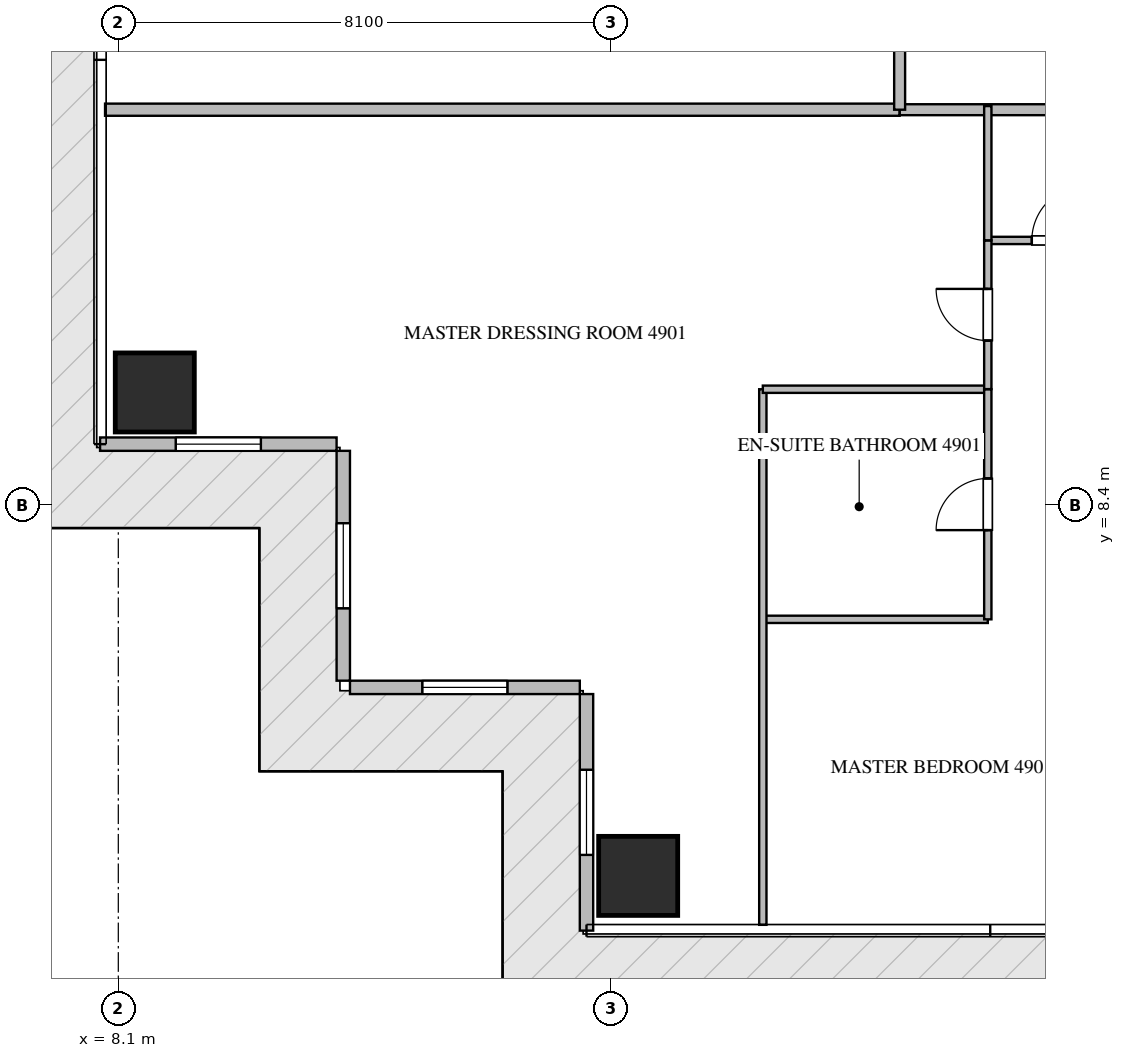
"""IFC4 building model, lengths in metres.
Left out: names, types, materials, properties, quantities, classifications, styles, units other than length and angle.
Written with IfcOpenShell. Run it as: python <this file> out.ifc"""

import sys

from ifc_helpers import new_model, si_unit, direction, frame, frame_2d, origin, origin_2d, place, context, subcontext, project, spatial, rectangle, extrude, source, transform, mapped, element, fill, save


model = new_model("IFC4")
c1 = context("Model", 3, precision=1e-05, world=origin(), true_north=direction((0.0, 1.0)))
c2 = subcontext(c1, "Body", "Model", "MODEL_VIEW")
j1 = project(units=[si_unit("LENGTHUNIT", "METRE"), si_unit("PLANEANGLEUNIT", "RADIAN")], contexts=[c1])
p1 = place(None, origin())
s1 = spatial("IfcSite", under=j1, at=p1, CompositionType="ELEMENT")
p2 = place(p1, origin())
s2 = spatial("IfcBuilding", under=s1, at=p2, CompositionType="ELEMENT")
p3 = place(p2, frame((0.0, 0.0, 195.15)))
s3 = spatial("IfcBuildingStorey", under=s2, at=p3, CompositionType="ELEMENT", Elevation=195.15)
m1 = source(origin(), c2, "Body", "SweptSolid", [
    extrude(rectangle(XDim=1.3, YDim=1.3, at=origin_2d()), origin(), (0.0, 0.0, 1.0), 3.57),
])
for number, where, z_axis, x_axis in (
    (1, (16.65, 2.3, -0.26), (0.0, 0.0, 1.0), (1.0, 0.0, 0.0)),
    (2, (8.7, 10.25, -0.26), (0.0, 0.0, 1.0), (1.0, 0.0, 0.0)),
):
    element("IfcColumn", number, at=place(p3, frame(where, z_axis=z_axis, x_axis=x_axis)), inside=s3, PredefinedType="COLUMN", context=c2, shape_type="MappedRepresentation", body=[
        mapped(m1, transform((0.0, 0.0, 0.0), scale=1.0)),
    ])
p4 = place(p3, frame((7.8, 9.4, 0.0), z_axis=(0.0, 0.0, 1.0), x_axis=(1.0, 0.0, 0.0)))
e3 = element("IfcWall", 3, at=p4, inside=s3, PredefinedType="ELEMENTEDWALL", context=c2, shape_type="SweptSolid", body=[
    extrude(rectangle(XDim=3.89, YDim=0.22, at=frame_2d((1.945, 0.0))), origin(), (0.0, 0.0, 1.0), 3.295),
])
p5 = place(p4, frame((1.245, 0.0, 0.65)))
e4 = element("IfcOpeningElement", 4, at=p5, cuts=e3, PredefinedType="OPENING", context=c2, shape_type="SweptSolid", body=[
    extrude(rectangle(XDim=1.4, YDim=1.35, at=frame_2d((0.7, 0.675))), frame((0.0, 0.12, 0.0), z_axis=(0.0, -1.0, 0.0), x_axis=(1.0, 0.0, 0.0)), (0.0, 0.0, 1.0), 0.24),
])
p6 = place(p3, frame((11.8, 9.29, 0.0), z_axis=(0.0, 0.0, 1.0), x_axis=(0.0, -1.0, 0.0)))
e5 = element("IfcWall", 5, at=p6, inside=s3, PredefinedType="ELEMENTEDWALL", context=c2, shape_type="SweptSolid", body=[
    extrude(rectangle(XDim=3.78, YDim=0.22, at=frame_2d((1.89, 0.0))), origin(), (0.0, 0.0, 1.0), 3.295),
])
p7 = place(p6, frame((1.19, 0.0, 0.65)))
e6 = element("IfcOpeningElement", 6, at=p7, cuts=e5, PredefinedType="OPENING", context=c2, shape_type="SweptSolid", body=[
    extrude(rectangle(XDim=1.4, YDim=1.35, at=frame_2d((0.7, 0.675))), frame((0.0, 0.12, 0.0), z_axis=(0.0, -1.0, 0.0), x_axis=(1.0, 0.0, 0.0)), (0.0, 0.0, 1.0), 0.24),
])
p8 = place(p3, frame((11.91, 5.4, 0.0), z_axis=(0.0, 0.0, 1.0), x_axis=(1.0, 0.0, 0.0)))
e7 = element("IfcWall", 7, at=p8, inside=s3, PredefinedType="ELEMENTEDWALL", context=c2, shape_type="SweptSolid", body=[
    extrude(rectangle(XDim=3.78, YDim=0.22, at=frame_2d((1.89, 0.0))), origin(), (0.0, 0.0, 1.0), 3.295),
])
p9 = place(p8, frame((1.19, 0.0, 0.65)))
e8 = element("IfcOpeningElement", 8, at=p9, cuts=e7, PredefinedType="OPENING", context=c2, shape_type="SweptSolid", body=[
    extrude(rectangle(XDim=1.4, YDim=1.35, at=frame_2d((0.7, 0.675))), frame((0.0, 0.12, 0.0), z_axis=(0.0, -1.0, 0.0), x_axis=(1.0, 0.0, 0.0)), (0.0, 0.0, 1.0), 0.24),
])
p10 = place(p3, frame((15.8, 5.29, 0.0), z_axis=(0.0, 0.0, 1.0), x_axis=(0.0, -1.0, 0.0)))
e9 = element("IfcWall", 9, at=p10, inside=s3, PredefinedType="ELEMENTEDWALL", context=c2, shape_type="SweptSolid", body=[
    extrude(rectangle(XDim=3.89, YDim=0.22, at=frame_2d((1.945, 0.0))), origin(), (0.0, 0.0, 1.0), 3.295),
])
p11 = place(p10, frame((1.245, 0.0, 0.65)))
e10 = element("IfcOpeningElement", 10, at=p11, cuts=e9, PredefinedType="OPENING", context=c2, shape_type="SweptSolid", body=[
    extrude(rectangle(XDim=1.4, YDim=1.35, at=frame_2d((0.7, 0.675))), frame((0.0, 0.12, 0.0), z_axis=(0.0, -1.0, 0.0), x_axis=(1.0, 0.0, 0.0)), (0.0, 0.0, 1.0), 0.24),
])
p12 = place(p3, frame((7.882, 14.9, 0.0), z_axis=(0.0, 0.0, 1.0), x_axis=(1.0, 0.0, 0.0)))
e11 = element("IfcWall", 11, at=p12, inside=s3, PredefinedType="PARTITIONING", context=c2, shape_type="SweptSolid", body=[
    extrude(rectangle(XDim=13.068, YDim=0.2, at=frame_2d((6.534, 0.0))), origin(), (0.0, 0.0, 1.0), 3.31),
])
p13 = place(p3, frame((20.952, 14.9, 0.0), z_axis=(0.0, 0.0, 1.0), x_axis=(1.0, 0.0, 0.0)))
e12 = element("IfcWall", 12, at=p13, inside=s3, PredefinedType="PARTITIONING", context=c2, shape_type="SweptSolid", body=[
    extrude(rectangle(XDim=22.896, YDim=0.18, at=frame_2d((11.448, 0.0))), origin(), (0.0, 0.0, 1.0), 2.145),
])
p14 = place(p13, frame((14.231, 0.0, 0.0)))
e13 = element("IfcOpeningElement", 13, at=p14, cuts=e12, PredefinedType="OPENING", context=c2, shape_type="SweptSolid", body=[
    extrude(rectangle(XDim=0.9, YDim=2.1, at=frame_2d((0.45, 1.05))), frame((0.0, 0.1, 0.0), z_axis=(0.0, -1.0, 0.0), x_axis=(1.0, 0.0, 0.0)), (0.0, 0.0, 1.0), 0.2),
])
p15 = place(p13, frame((19.203, 0.0, 0.0)))
e14 = element("IfcOpeningElement", 14, at=p15, cuts=e12, PredefinedType="OPENING", context=c2, shape_type="SweptSolid", body=[
    extrude(rectangle(XDim=0.9, YDim=2.1, at=frame_2d((0.45, 1.05))), frame((0.0, 0.1, 0.0), z_axis=(0.0, -1.0, 0.0), x_axis=(1.0, 0.0, 0.0)), (0.0, 0.0, 1.0), 0.2),
])
p16 = place(p3, frame((20.95, 14.9, 0.0), z_axis=(0.0, 0.0, 1.0), x_axis=(0.0, 1.0, 0.0)))
e15 = element("IfcWall", 15, at=p16, inside=s3, PredefinedType="PARTITIONING", context=c2, shape_type="SweptSolid", body=[
    extrude(rectangle(XDim=18.7, YDim=0.18, at=frame_2d((9.35, 0.0))), origin(), (0.0, 0.0, 1.0), 3.31),
])
p17 = place(p16, frame((1.805, 0.0, 0.0)))
e16 = element("IfcOpeningElement", 16, at=p17, cuts=e15, PredefinedType="OPENING", context=c2, shape_type="SweptSolid", body=[
    extrude(rectangle(XDim=1.0, YDim=2.15, at=frame_2d((0.5, 1.075))), frame((0.0, 0.1, 0.0), z_axis=(0.0, -1.0, 0.0), x_axis=(1.0, 0.0, 0.0)), (0.0, 0.0, 1.0), 0.2),
])
p18 = place(p16, frame((10.602, 0.0, 0.0)))
e17 = element("IfcOpeningElement", 17, at=p18, cuts=e15, PredefinedType="OPENING", context=c2, shape_type="SweptSolid", body=[
    extrude(rectangle(XDim=1.0, YDim=2.15, at=frame_2d((0.5, 1.075))), frame((0.0, 0.1, 0.0), z_axis=(0.0, -1.0, 0.0), x_axis=(1.0, 0.0, 0.0)), (0.0, 0.0, 1.0), 0.2),
])
p19 = place(p3, frame((22.4, 12.75, 0.0), z_axis=(0.0, 0.0, 1.0), x_axis=(1.0, 0.0, 0.0)))
e18 = element("IfcWall", 18, at=p19, inside=s3, PredefinedType="PARTITIONING", context=c2, shape_type="SweptSolid", body=[
    extrude(rectangle(XDim=2.348, YDim=0.12, at=frame_2d((1.174, 0.0))), origin(), (0.0, 0.0, 1.0), 3.31),
])
p20 = place(p19, frame((0.724, 0.0, 0.0)))
e19 = element("IfcOpeningElement", 19, at=p20, cuts=e18, PredefinedType="OPENING", context=c2, shape_type="SweptSolid", body=[
    extrude(rectangle(XDim=0.9, YDim=2.1, at=frame_2d((0.45, 1.05))), frame((0.0, 0.07, 0.0), z_axis=(0.0, -1.0, 0.0), x_axis=(1.0, 0.0, 0.0)), (0.0, 0.0, 1.0), 0.14),
])
p21 = place(p3, frame((18.7, 6.519, 0.0), z_axis=(0.0, 0.0, 1.0), x_axis=(1.0, 0.0, 0.0)))
e20 = element("IfcWall", 20, at=p21, inside=s3, PredefinedType="PARTITIONING", context=c2, shape_type="SweptSolid", body=[
    extrude(rectangle(XDim=3.7, YDim=0.12, at=frame_2d((1.85, 0.0))), origin(), (0.0, 0.0, 1.0), 3.31),
])
p22 = place(p3, frame((18.7, 1.495, 0.0), z_axis=(0.0, 0.0, 1.0), x_axis=(0.0, 1.0, 0.0)))
e21 = element("IfcWall", 21, at=p22, inside=s3, PredefinedType="PARTITIONING", context=c2, shape_type="SweptSolid", body=[
    extrude(rectangle(XDim=8.808, YDim=0.12, at=frame_2d((4.404, 0.0))), origin(), (0.0, 0.0, 1.0), 3.31),
])
p23 = place(p3, frame((18.7, 10.303, 0.0), z_axis=(0.0, 0.0, 1.0), x_axis=(1.0, 0.0, 0.0)))
e22 = element("IfcWall", 22, at=p23, inside=s3, PredefinedType="PARTITIONING", context=c2, shape_type="SweptSolid", body=[
    extrude(rectangle(XDim=3.7, YDim=0.12, at=frame_2d((1.85, 0.0))), origin(), (0.0, 0.0, 1.0), 2.145),
])
p24 = place(p3, frame((22.4, 6.519, 0.0), z_axis=(0.0, 0.0, 1.0), x_axis=(0.0, 1.0, 0.0)))
e23 = element("IfcWall", 23, at=p24, inside=s3, PredefinedType="PARTITIONING", context=c2, shape_type="SweptSolid", body=[
    extrude(rectangle(XDim=3.784, YDim=0.12, at=frame_2d((1.892, 0.0))), origin(), (0.0, 0.0, 1.0), 3.31),
])
p25 = place(p24, frame((1.467, 0.0, 0.0)))
e24 = element("IfcOpeningElement", 24, at=p25, cuts=e23, PredefinedType="OPENING", context=c2, shape_type="SweptSolid", body=[
    extrude(rectangle(XDim=0.85, YDim=2.1, at=frame_2d((0.425, 1.05))), frame((0.0, 0.07, 0.0), z_axis=(0.0, -1.0, 0.0), x_axis=(1.0, 0.0, 0.0)), (0.0, 0.0, 1.0), 0.14),
])
p26 = place(p3, frame((22.4, 10.305, 0.0), z_axis=(0.0, 0.0, 1.0), x_axis=(0.0, 1.0, 0.0)))
e25 = element("IfcWall", 25, at=p26, inside=s3, PredefinedType="PARTITIONING", context=c2, shape_type="SweptSolid", body=[
    extrude(rectangle(XDim=2.445, YDim=0.12, at=frame_2d((1.223, 0.0))), origin(), (0.0, 0.0, 1.0), 3.31),
])
p27 = place(p26, frame((0.798, 0.0, 0.0)))
e26 = element("IfcOpeningElement", 26, at=p27, cuts=e25, PredefinedType="OPENING", context=c2, shape_type="SweptSolid", body=[
    extrude(rectangle(XDim=0.85, YDim=2.1, at=frame_2d((0.425, 1.05))), frame((0.0, 0.07, 0.0), z_axis=(0.0, -1.0, 0.0), x_axis=(1.0, 0.0, 0.0)), (0.0, 0.0, 1.0), 0.14),
])
p28 = place(p3, frame((22.4, 12.752, 0.0), z_axis=(0.0, 0.0, 1.0), x_axis=(0.0, 1.0, 0.0)))
e27 = element("IfcWall", 27, at=p28, inside=s3, PredefinedType="PARTITIONING", context=c2, shape_type="SweptSolid", body=[
    extrude(rectangle(XDim=2.208, YDim=0.12, at=frame_2d((1.104, 0.0))), origin(), (0.0, 0.0, 1.0), 3.31),
])
m2 = source(origin(), c2, "Body", "SweptSolid", [
    extrude(rectangle(XDim=1.4, YDim=1.35, at=frame_2d((0.7, 0.675))), frame((0.0, 0.03, 0.0), z_axis=(0.0, -1.0, 0.0), x_axis=(1.0, 0.0, 0.0)), (0.0, 0.0, 1.0), 0.06),
])
p29 = place(p5, origin())
e28 = element("IfcWindow", 28, at=p29, inside=s3, PartitioningType="SINGLE_PANEL", PredefinedType="WINDOW", context=c2, shape_type="MappedRepresentation", body=[
    mapped(m2, transform((0.0, 0.0, 0.0), scale=1.0)),
])
fill(e4, e28)
p30 = place(p7, origin())
e29 = element("IfcWindow", 29, at=p30, inside=s3, PartitioningType="SINGLE_PANEL", PredefinedType="WINDOW", context=c2, shape_type="MappedRepresentation", body=[
    mapped(m2, transform((0.0, 0.0, 0.0), scale=1.0)),
])
fill(e6, e29)
p31 = place(p9, origin())
e30 = element("IfcWindow", 30, at=p31, inside=s3, PartitioningType="SINGLE_PANEL", PredefinedType="WINDOW", context=c2, shape_type="MappedRepresentation", body=[
    mapped(m2, transform((0.0, 0.0, 0.0), scale=1.0)),
])
fill(e8, e30)
p32 = place(p11, origin())
e31 = element("IfcWindow", 31, at=p32, inside=s3, PartitioningType="SINGLE_PANEL", PredefinedType="WINDOW", context=c2, shape_type="MappedRepresentation", body=[
    mapped(m2, transform((0.0, 0.0, 0.0), scale=1.0)),
])
fill(e10, e31)
m3 = source(origin(), c2, "Body", "SweptSolid", [
    extrude(rectangle(XDim=0.9, YDim=2.1, at=frame_2d((0.45, 1.05))), frame((0.0, 0.025, 0.0), z_axis=(0.0, -1.0, 0.0), x_axis=(1.0, 0.0, 0.0)), (0.0, 0.0, 1.0), 0.05),
])
p33 = place(p20, origin())
e32 = element("IfcDoor", 32, at=p33, inside=s3, OperationType="SINGLE_SWING_RIGHT", PredefinedType="DOOR", context=c2, shape_type="MappedRepresentation", body=[
    mapped(m3, transform((0.0, 0.0, 0.0), scale=1.0)),
])
fill(e19, e32)
m4 = source(origin(), c2, "Body", "SweptSolid", [
    extrude(rectangle(XDim=0.85, YDim=2.1, at=frame_2d((0.425, 1.05))), frame((0.0, 0.025, 0.0), z_axis=(0.0, -1.0, 0.0), x_axis=(1.0, 0.0, 0.0)), (0.0, 0.0, 1.0), 0.05),
])
p34 = place(p25, origin())
e33 = element("IfcDoor", 33, at=p34, inside=s3, OperationType="SINGLE_SWING_LEFT", PredefinedType="DOOR", context=c2, shape_type="MappedRepresentation", body=[
    mapped(m4, transform((0.0, 0.0, 0.0), scale=1.0)),
])
fill(e24, e33)
p35 = place(p27, origin())
e34 = element("IfcDoor", 34, at=p35, inside=s3, OperationType="SINGLE_SWING_RIGHT", PredefinedType="DOOR", context=c2, shape_type="MappedRepresentation", body=[
    mapped(m4, transform((0.0, 0.0, 0.0), scale=1.0)),
])
fill(e26, e34)
save(model, sys.argv[1])
